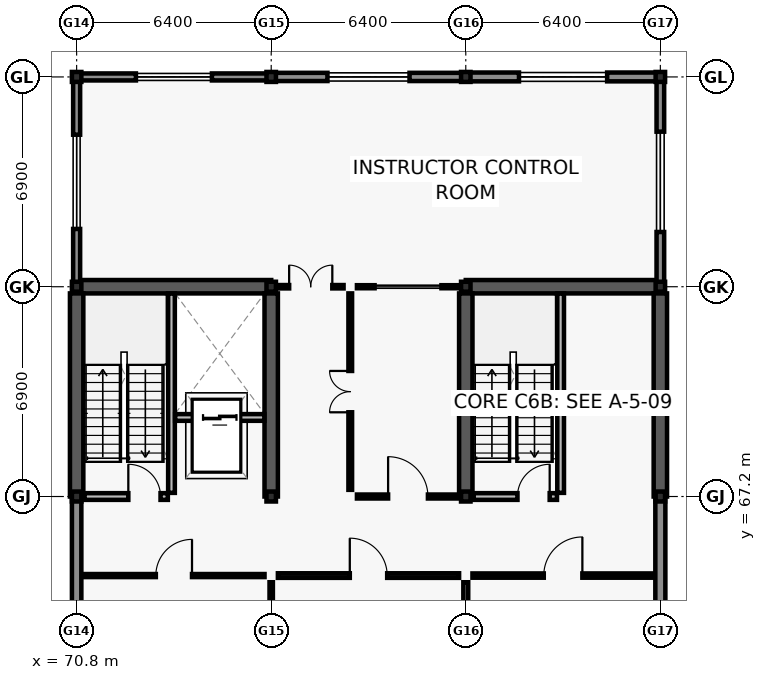
"""IFC4 building model, lengths in metres.
Left out: names, types, materials, properties, quantities, classifications, styles, units other than length and angle.
Written with IfcOpenShell. Run it as: python <this file> out.ifc"""

import sys

from ifc_helpers import new_model, si_unit, direction, frame, frame_2d, origin, origin_2d, place, context, subcontext, project, spatial, rectangle, i_section, extrude, element, fill, save


model = new_model("IFC4")
c1 = context("Model", 3, precision=1e-05, world=origin(), true_north=direction((0.0, 1.0)))
c2 = subcontext(c1, "Body", "Model", "MODEL_VIEW")
j1 = project(units=[si_unit("LENGTHUNIT", "METRE"), si_unit("PLANEANGLEUNIT", "RADIAN")], contexts=[c1])
p1 = place(None, origin())
s1 = spatial("IfcSite", under=j1, at=p1, CompositionType="ELEMENT")
p2 = place(p1, origin())
s2 = spatial("IfcBuilding", under=s1, at=p2, CompositionType="ELEMENT")
p3 = place(p2, frame((0.0, 0.0, 5.4)))
s3 = spatial("IfcBuildingStorey", under=s2, at=p3, CompositionType="ELEMENT", Elevation=5.4)
for number, where, z_axis, x_axis in (
    (1, (70.8, 67.2, 0.0), (0.0, 0.0, 1.0), (1.0, 0.0, 0.0)),
    (2, (70.8, 74.1, 0.0), (0.0, 0.0, 1.0), (1.0, 0.0, 0.0)),
    (3, (70.8, 81.0, 0.0), (0.0, 0.0, 1.0), (1.0, 0.0, 0.0)),
    (4, (77.2, 67.2, 0.0), (0.0, 0.0, 1.0), (1.0, 0.0, 0.0)),
    (5, (77.2, 74.1, 0.0), (0.0, 0.0, 1.0), (1.0, 0.0, 0.0)),
    (6, (77.2, 81.0, 0.0), (0.0, 0.0, 1.0), (1.0, 0.0, 0.0)),
    (7, (83.6, 67.2, 0.0), (0.0, 0.0, 1.0), (1.0, 0.0, 0.0)),
    (8, (83.6, 74.1, 0.0), (0.0, 0.0, 1.0), (1.0, 0.0, 0.0)),
    (9, (83.6, 81.0, 0.0), (0.0, 0.0, 1.0), (1.0, 0.0, 0.0)),
    (10, (90.0, 67.2, 0.0), (0.0, 0.0, 1.0), (1.0, 0.0, 0.0)),
    (11, (90.0, 74.1, 0.0), (0.0, 0.0, 1.0), (1.0, 0.0, 0.0)),
    (12, (90.0, 81.0, 0.0), (0.0, 0.0, 1.0), (1.0, 0.0, 0.0)),
):
    element("IfcColumn", number, at=place(p3, frame(where, z_axis=z_axis, x_axis=x_axis)), inside=s3, PredefinedType="COLUMN", context=c2, shape_type="SweptSolid", body=[
        extrude(i_section(OverallWidth=0.311, OverallDepth=0.327, WebThickness=0.016, FlangeThickness=0.025, FilletRadius=0.017, at=origin_2d()), origin(), (0.0, 0.0, 1.0), 4.2),
    ])
p4 = place(p3, frame((70.8, 74.1, 0.0), z_axis=(0.0, 0.0, 1.0), x_axis=(1.0, 0.0, 0.0)))
e13 = element("IfcWall", 13, at=p4, inside=s3, PredefinedType="SHEAR", context=c2, shape_type="SweptSolid", body=[
    extrude(rectangle(XDim=6.4, YDim=0.44, at=frame_2d((3.2, 0.0))), origin(), (0.0, 0.0, 1.0), 3.96),
])
for number, where, z_axis, x_axis in (
    (14, (70.8, 67.2, 0.0), (0.0, 0.0, 1.0), (0.0, 1.0, 0.0)),
    (15, (77.2, 67.2, 0.0), (0.0, 0.0, 1.0), (0.0, 1.0, 0.0)),
):
    element("IfcWall", number, at=place(p3, frame(where, z_axis=z_axis, x_axis=x_axis)), inside=s3, PredefinedType="SHEAR", context=c2, shape_type="SweptSolid", body=[
        extrude(rectangle(XDim=6.68, YDim=0.44, at=frame_2d((3.34, 0.0))), origin(), (0.0, 0.0, 1.0), 3.96),
    ])
p5 = place(p3, frame((83.6, 74.1, 0.0), z_axis=(0.0, 0.0, 1.0), x_axis=(1.0, 0.0, 0.0)))
e16 = element("IfcWall", 16, at=p5, inside=s3, PredefinedType="SHEAR", context=c2, shape_type="SweptSolid", body=[
    extrude(rectangle(XDim=6.4, YDim=0.44, at=frame_2d((3.2, 0.0))), origin(), (0.0, 0.0, 1.0), 3.96),
])
for number, where, z_axis, x_axis in (
    (17, (83.6, 67.2, 0.0), (0.0, 0.0, 1.0), (0.0, 1.0, 0.0)),
    (18, (90.0, 67.2, 0.0), (0.0, 0.0, 1.0), (0.0, 1.0, 0.0)),
):
    element("IfcWall", number, at=place(p3, frame(where, z_axis=z_axis, x_axis=x_axis)), inside=s3, PredefinedType="SHEAR", context=c2, shape_type="SweptSolid", body=[
        extrude(rectangle(XDim=6.68, YDim=0.44, at=frame_2d((3.34, 0.0))), origin(), (0.0, 0.0, 1.0), 3.96),
    ])
p6 = place(p3, frame((70.805, 81.0, 0.0), z_axis=(0.0, 0.0, 1.0), x_axis=(1.0, 0.0, 0.0)))
e19 = element("IfcWall", 19, at=p6, inside=s3, PredefinedType="SOLIDWALL", context=c2, shape_type="SweptSolid", body=[
    extrude(rectangle(XDim=6.39, YDim=0.23, at=frame_2d((3.195, 0.0))), origin(), (0.0, 0.0, 1.0), 3.32),
])
p7 = place(p6, frame((1.945, 0.0, 0.8)))
e20 = element("IfcOpeningElement", 20, at=p7, cuts=e19, PredefinedType="OPENING", context=c2, shape_type="SweptSolid", body=[
    extrude(rectangle(XDim=2.5, YDim=1.15, at=frame_2d((1.25, 0.575))), frame((0.0, 0.125, 0.0), z_axis=(0.0, -1.0, 0.0), x_axis=(1.0, 0.0, 0.0)), (0.0, 0.0, 1.0), 0.25),
])
p8 = place(p3, frame((77.205, 81.0, 0.0), z_axis=(0.0, 0.0, 1.0), x_axis=(1.0, 0.0, 0.0)))
e21 = element("IfcWall", 21, at=p8, inside=s3, PredefinedType="SOLIDWALL", context=c2, shape_type="SweptSolid", body=[
    extrude(rectangle(XDim=6.39, YDim=0.27, at=frame_2d((3.195, 0.0))), origin(), (0.0, 0.0, 1.0), 3.32),
])
p9 = place(p8, frame((1.845, 0.0, 0.8)))
e22 = element("IfcOpeningElement", 22, at=p9, cuts=e21, PredefinedType="OPENING", context=c2, shape_type="SweptSolid", body=[
    extrude(rectangle(XDim=2.7, YDim=1.15, at=frame_2d((1.35, 0.575))), frame((0.0, 0.145, 0.0), z_axis=(0.0, -1.0, 0.0), x_axis=(1.0, 0.0, 0.0)), (0.0, 0.0, 1.0), 0.29),
])
p10 = place(p3, frame((83.605, 81.0, 0.0), z_axis=(0.0, 0.0, 1.0), x_axis=(1.0, 0.0, 0.0)))
e23 = element("IfcWall", 23, at=p10, inside=s3, PredefinedType="SOLIDWALL", context=c2, shape_type="SweptSolid", body=[
    extrude(rectangle(XDim=6.39, YDim=0.29, at=frame_2d((3.195, 0.0))), origin(), (0.0, 0.0, 1.0), 3.32),
])
p11 = place(p10, frame((1.745, 0.0, 0.8)))
e24 = element("IfcOpeningElement", 24, at=p11, cuts=e23, PredefinedType="OPENING", context=c2, shape_type="SweptSolid", body=[
    extrude(rectangle(XDim=2.9, YDim=1.15, at=frame_2d((1.45, 0.575))), frame((0.0, 0.155, 0.0), z_axis=(0.0, -1.0, 0.0), x_axis=(1.0, 0.0, 0.0)), (0.0, 0.0, 1.0), 0.31),
])
p12 = place(p3, frame((70.8, 60.305, 0.0), z_axis=(0.0, 0.0, 1.0), x_axis=(0.0, 1.0, 0.0)))
e25 = element("IfcWall", 25, at=p12, inside=s3, PredefinedType="SOLIDWALL", context=c2, shape_type="SweptSolid", body=[
    extrude(rectangle(XDim=6.89, YDim=0.31, at=frame_2d((3.445, 0.0))), origin(), (0.0, 0.0, 1.0), 3.32),
])
p13 = place(p3, frame((90.0, 67.195, 0.0), z_axis=(0.0, 0.0, 1.0), x_axis=(0.0, -1.0, 0.0)))
e26 = element("IfcWall", 26, at=p13, inside=s3, PredefinedType="SOLIDWALL", context=c2, shape_type="SweptSolid", body=[
    extrude(rectangle(XDim=6.89, YDim=0.33, at=frame_2d((3.445, 0.0))), origin(), (0.0, 0.0, 1.0), 3.32),
])
p14 = place(p3, frame((70.8, 74.105, 0.0), z_axis=(0.0, 0.0, 1.0), x_axis=(0.0, 1.0, 0.0)))
e27 = element("IfcWall", 27, at=p14, inside=s3, PredefinedType="SOLIDWALL", context=c2, shape_type="SweptSolid", body=[
    extrude(rectangle(XDim=6.89, YDim=0.23, at=frame_2d((3.445, 0.0))), origin(), (0.0, 0.0, 1.0), 3.32),
])
p15 = place(p14, frame((1.895, 0.0, 0.8)))
e28 = element("IfcOpeningElement", 28, at=p15, cuts=e27, PredefinedType="OPENING", context=c2, shape_type="SweptSolid", body=[
    extrude(rectangle(XDim=3.1, YDim=1.15, at=frame_2d((1.55, 0.575))), frame((0.0, 0.125, 0.0), z_axis=(0.0, -1.0, 0.0), x_axis=(1.0, 0.0, 0.0)), (0.0, 0.0, 1.0), 0.25),
])
p16 = place(p3, frame((90.0, 80.995, 0.0), z_axis=(0.0, 0.0, 1.0), x_axis=(0.0, -1.0, 0.0)))
e29 = element("IfcWall", 29, at=p16, inside=s3, PredefinedType="SOLIDWALL", context=c2, shape_type="SweptSolid", body=[
    extrude(rectangle(XDim=6.89, YDim=0.25, at=frame_2d((3.445, 0.0))), origin(), (0.0, 0.0, 1.0), 3.32),
])
p17 = place(p16, frame((1.795, 0.0, 0.8)))
e30 = element("IfcOpeningElement", 30, at=p17, cuts=e29, PredefinedType="OPENING", context=c2, shape_type="SweptSolid", body=[
    extrude(rectangle(XDim=3.3, YDim=1.25, at=frame_2d((1.65, 0.625))), frame((0.0, 0.135, 0.0), z_axis=(0.0, -1.0, 0.0), x_axis=(1.0, 0.0, 0.0)), (0.0, 0.0, 1.0), 0.27),
])
p18 = place(p3, frame((73.92, 67.32, 0.0), z_axis=(0.0, 0.0, 1.0), x_axis=(0.0, 1.0, 0.0)))
e31 = element("IfcWall", 31, at=p18, inside=s3, PredefinedType="SOLIDWALL", context=c2, shape_type="SweptSolid", body=[
    extrude(rectangle(XDim=6.555, YDim=0.22, at=frame_2d((3.277, 0.0))), origin(), (0.0, 0.0, 1.0), 3.96),
])
p19 = place(p3, frame((71.06, 67.2, 0.0), z_axis=(0.0, 0.0, 1.0), x_axis=(1.0, 0.0, 0.0)))
e32 = element("IfcWall", 32, at=p19, inside=s3, PredefinedType="SOLIDWALL", context=c2, shape_type="SweptSolid", body=[
    extrude(rectangle(XDim=2.74, YDim=0.22, at=frame_2d((1.37, 0.0))), origin(), (0.0, 0.0, 1.0), 3.32),
])
p20 = place(p19, frame((1.44, 0.0, 0.0)))
e33 = element("IfcOpeningElement", 33, at=p20, cuts=e32, PredefinedType="OPENING", context=c2, shape_type="SweptSolid", body=[
    extrude(rectangle(XDim=1.06, YDim=2.1, at=frame_2d((0.53, 1.05))), frame((0.0, 0.12, 0.0), z_axis=(0.0, -1.0, 0.0), x_axis=(1.0, 0.0, 0.0)), (0.0, 0.0, 1.0), 0.24),
])
p21 = place(p3, frame((74.04, 69.8, 0.0), z_axis=(0.0, 0.0, 1.0), x_axis=(1.0, 0.0, 0.0)))
e34 = element("IfcWall", 34, at=p21, inside=s3, PredefinedType="SOLIDWALL", context=c2, shape_type="SweptSolid", body=[
    extrude(rectangle(XDim=2.935, YDim=0.22, at=frame_2d((1.468, 0.0))), origin(), (0.0, 0.0, 1.0), 3.96),
])
p22 = place(p21, frame((0.917, 0.0, 0.0)))
e35 = element("IfcOpeningElement", 35, at=p22, cuts=e34, PredefinedType="OPENING", context=c2, shape_type="SweptSolid", body=[
    extrude(rectangle(XDim=1.1, YDim=2.1, at=frame_2d((0.55, 1.05))), frame((0.0, 0.12, 0.0), z_axis=(0.0, -1.0, 0.0), x_axis=(1.0, 0.0, 0.0)), (0.0, 0.0, 1.0), 0.24),
])
p23 = place(p3, frame((86.72, 67.32, 0.0), z_axis=(0.0, 0.0, 1.0), x_axis=(0.0, 1.0, 0.0)))
e36 = element("IfcWall", 36, at=p23, inside=s3, PredefinedType="SOLIDWALL", context=c2, shape_type="SweptSolid", body=[
    extrude(rectangle(XDim=6.555, YDim=0.22, at=frame_2d((3.277, 0.0))), origin(), (0.0, 0.0, 1.0), 3.96),
])
p24 = place(p3, frame((83.86, 67.2, 0.0), z_axis=(0.0, 0.0, 1.0), x_axis=(1.0, 0.0, 0.0)))
e37 = element("IfcWall", 37, at=p24, inside=s3, PredefinedType="SOLIDWALL", context=c2, shape_type="SweptSolid", body=[
    extrude(rectangle(XDim=2.74, YDim=0.22, at=frame_2d((1.37, 0.0))), origin(), (0.0, 0.0, 1.0), 3.32),
])
p25 = place(p24, frame((1.44, 0.0, 0.0)))
e38 = element("IfcOpeningElement", 38, at=p25, cuts=e37, PredefinedType="OPENING", context=c2, shape_type="SweptSolid", body=[
    extrude(rectangle(XDim=1.06, YDim=2.1, at=frame_2d((0.53, 1.05))), frame((0.0, 0.12, 0.0), z_axis=(0.0, -1.0, 0.0), x_axis=(1.0, 0.0, 0.0)), (0.0, 0.0, 1.0), 0.24),
])
p26 = place(p3, frame((77.2, 60.52, 0.0), z_axis=(0.0, 0.0, 1.0), x_axis=(0.0, 1.0, 0.0)))
e39 = element("IfcWall", 39, at=p26, inside=s3, PredefinedType="PARTITIONING", context=c2, shape_type="SweptSolid", body=[
    extrude(rectangle(XDim=3.86, YDim=0.11, at=frame_2d((1.93, 0.0))), origin(), (0.0, 0.0, 1.0), 3.3),
])
p27 = place(p3, frame((71.02, 64.6, 0.0), z_axis=(0.0, 0.0, 1.0), x_axis=(1.0, 0.0, 0.0)))
e40 = element("IfcWall", 40, at=p27, inside=s3, PredefinedType="PARTITIONING", context=c2, shape_type="SweptSolid", body=[
    extrude(rectangle(XDim=5.96, YDim=0.1, at=frame_2d((2.98, 0.0))), origin(), (0.0, 0.0, 1.0), 3.3),
])
p28 = place(p27, frame((2.385, 0.0, 0.0)))
e41 = element("IfcOpeningElement", 41, at=p28, cuts=e40, PredefinedType="OPENING", context=c2, shape_type="SweptSolid", body=[
    extrude(rectangle(XDim=1.19, YDim=2.14, at=frame_2d((0.595, 1.07))), frame((0.0, 0.06, 0.0), z_axis=(0.0, -1.0, 0.0), x_axis=(1.0, 0.0, 0.0)), (0.0, 0.0, 1.0), 0.12),
])
p29 = place(p3, frame((83.6, 60.52, 0.0), z_axis=(0.0, 0.0, 1.0), x_axis=(0.0, 1.0, 0.0)))
e42 = element("IfcWall", 42, at=p29, inside=s3, PredefinedType="PARTITIONING", context=c2, shape_type="SweptSolid", body=[
    extrude(rectangle(XDim=3.86, YDim=0.16, at=frame_2d((1.93, 0.0))), origin(), (0.0, 0.0, 1.0), 3.3),
])
p30 = place(p3, frame((77.42, 64.6, 0.0), z_axis=(0.0, 0.0, 1.0), x_axis=(1.0, 0.0, 0.0)))
e43 = element("IfcWall", 43, at=p30, inside=s3, PredefinedType="PARTITIONING", context=c2, shape_type="SweptSolid", body=[
    extrude(rectangle(XDim=5.96, YDim=0.15, at=frame_2d((2.98, 0.0))), origin(), (0.0, 0.0, 1.0), 3.3),
])
p31 = place(p30, frame((2.365, 0.0, 0.0)))
e44 = element("IfcOpeningElement", 44, at=p31, cuts=e43, PredefinedType="OPENING", context=c2, shape_type="SweptSolid", body=[
    extrude(rectangle(XDim=1.23, YDim=2.08, at=frame_2d((0.615, 1.04))), frame((0.0, 0.085, 0.0), z_axis=(0.0, -1.0, 0.0), x_axis=(1.0, 0.0, 0.0)), (0.0, 0.0, 1.0), 0.17),
])
p32 = place(p3, frame((83.82, 64.6, 0.0), z_axis=(0.0, 0.0, 1.0), x_axis=(1.0, 0.0, 0.0)))
e45 = element("IfcWall", 45, at=p32, inside=s3, PredefinedType="PARTITIONING", context=c2, shape_type="SweptSolid", body=[
    extrude(rectangle(XDim=5.96, YDim=0.14, at=frame_2d((2.98, 0.0))), origin(), (0.0, 0.0, 1.0), 3.3),
])
p33 = place(p32, frame((2.345, 0.0, 0.0)))
e46 = element("IfcOpeningElement", 46, at=p33, cuts=e45, PredefinedType="OPENING", context=c2, shape_type="SweptSolid", body=[
    extrude(rectangle(XDim=1.27, YDim=2.1, at=frame_2d((0.635, 1.05))), frame((0.0, 0.08, 0.0), z_axis=(0.0, -1.0, 0.0), x_axis=(1.0, 0.0, 0.0)), (0.0, 0.0, 1.0), 0.16),
])
p34 = place(p3, frame((80.02, 67.2, 0.0), z_axis=(0.0, 0.0, 1.0), x_axis=(1.0, 0.0, 0.0)))
e47 = element("IfcWall", 47, at=p34, inside=s3, PredefinedType="PARTITIONING", context=c2, shape_type="SweptSolid", body=[
    extrude(rectangle(XDim=3.36, YDim=0.13, at=frame_2d((1.68, 0.0))), origin(), (0.0, 0.0, 1.0), 3.3),
])
p35 = place(p34, frame((1.025, 0.0, 0.0)))
e48 = element("IfcOpeningElement", 48, at=p35, cuts=e47, PredefinedType="OPENING", context=c2, shape_type="SweptSolid", body=[
    extrude(rectangle(XDim=1.31, YDim=2.14, at=frame_2d((0.655, 1.07))), frame((0.0, 0.075, 0.0), z_axis=(0.0, -1.0, 0.0), x_axis=(1.0, 0.0, 0.0)), (0.0, 0.0, 1.0), 0.15),
])
p36 = place(p3, frame((79.8, 67.42, 0.0), z_axis=(0.0, 0.0, 1.0), x_axis=(0.0, 1.0, 0.0)))
e49 = element("IfcWall", 49, at=p36, inside=s3, PredefinedType="PARTITIONING", context=c2, shape_type="SweptSolid", body=[
    extrude(rectangle(XDim=6.46, YDim=0.12, at=frame_2d((3.23, 0.0))), origin(), (0.0, 0.0, 1.0), 3.3),
])
p37 = place(p36, frame((2.55, 0.0, 0.0)))
e50 = element("IfcOpeningElement", 50, at=p37, cuts=e49, PredefinedType="OPENING", context=c2, shape_type="SweptSolid", body=[
    extrude(rectangle(XDim=1.36, YDim=2.15, at=frame_2d((0.68, 1.075))), frame((0.0, 0.07, 0.0), z_axis=(0.0, -1.0, 0.0), x_axis=(1.0, 0.0, 0.0)), (0.0, 0.0, 1.0), 0.14),
])
p38 = place(p3, frame((77.42, 74.1, 0.0), z_axis=(0.0, 0.0, 1.0), x_axis=(1.0, 0.0, 0.0)))
e51 = element("IfcWall", 51, at=p38, inside=s3, PredefinedType="PARTITIONING", context=c2, shape_type="SweptSolid", body=[
    extrude(rectangle(XDim=2.16, YDim=0.11, at=frame_2d((1.08, 0.0))), origin(), (0.0, 0.0, 1.0), 3.3),
])
p39 = place(p38, frame((0.37, 0.0, 0.0)))
e52 = element("IfcOpeningElement", 52, at=p39, cuts=e51, PredefinedType="OPENING", context=c2, shape_type="SweptSolid", body=[
    extrude(rectangle(XDim=1.42, YDim=2.15, at=frame_2d((0.71, 1.075))), frame((0.0, 0.065, 0.0), z_axis=(0.0, -1.0, 0.0), x_axis=(1.0, 0.0, 0.0)), (0.0, 0.0, 1.0), 0.13),
])
p40 = place(p3, frame((80.02, 74.1, 0.0), z_axis=(0.0, 0.0, 1.0), x_axis=(1.0, 0.0, 0.0)))
e53 = element("IfcWall", 53, at=p40, inside=s3, PredefinedType="PARTITIONING", context=c2, shape_type="SweptSolid", body=[
    extrude(rectangle(XDim=3.36, YDim=0.1, at=frame_2d((1.68, 0.0))), origin(), (0.0, 0.0, 1.0), 3.3),
])
p41 = place(p40, frame((0.58, 0.0, 0.95)))
e54 = element("IfcOpeningElement", 54, at=p41, cuts=e53, PredefinedType="OPENING", context=c2, shape_type="SweptSolid", body=[
    extrude(rectangle(XDim=2.2, YDim=1.3, at=frame_2d((1.1, 0.65))), frame((0.0, 0.06, 0.0), z_axis=(0.0, -1.0, 0.0), x_axis=(1.0, 0.0, 0.0)), (0.0, 0.0, 1.0), 0.12),
])
p42 = place(p7, origin())
e55 = element("IfcWindow", 55, at=p42, inside=s3, PartitioningType="TRIPLE_PANEL_VERTICAL", PredefinedType="WINDOW", context=c2, shape_type="SweptSolid", body=[
    extrude(rectangle(XDim=2.5, YDim=1.15, at=frame_2d((1.25, 0.575))), frame((0.0, 0.03, 0.0), z_axis=(0.0, -1.0, 0.0), x_axis=(1.0, 0.0, 0.0)), (0.0, 0.0, 1.0), 0.06),
])
fill(e20, e55)
p43 = place(p9, origin())
e56 = element("IfcWindow", 56, at=p43, inside=s3, PartitioningType="TRIPLE_PANEL_VERTICAL", PredefinedType="WINDOW", context=c2, shape_type="SweptSolid", body=[
    extrude(rectangle(XDim=2.7, YDim=1.15, at=frame_2d((1.35, 0.575))), frame((0.0, 0.03, 0.0), z_axis=(0.0, -1.0, 0.0), x_axis=(1.0, 0.0, 0.0)), (0.0, 0.0, 1.0), 0.06),
])
fill(e22, e56)
p44 = place(p11, origin())
e57 = element("IfcWindow", 57, at=p44, inside=s3, PartitioningType="TRIPLE_PANEL_VERTICAL", PredefinedType="WINDOW", context=c2, shape_type="SweptSolid", body=[
    extrude(rectangle(XDim=2.9, YDim=1.15, at=frame_2d((1.45, 0.575))), frame((0.0, 0.03, 0.0), z_axis=(0.0, -1.0, 0.0), x_axis=(1.0, 0.0, 0.0)), (0.0, 0.0, 1.0), 0.06),
])
fill(e24, e57)
p45 = place(p15, origin())
e58 = element("IfcWindow", 58, at=p45, inside=s3, PartitioningType="TRIPLE_PANEL_VERTICAL", PredefinedType="WINDOW", context=c2, shape_type="SweptSolid", body=[
    extrude(rectangle(XDim=3.1, YDim=1.15, at=frame_2d((1.55, 0.575))), frame((0.0, 0.03, 0.0), z_axis=(0.0, -1.0, 0.0), x_axis=(1.0, 0.0, 0.0)), (0.0, 0.0, 1.0), 0.06),
])
fill(e28, e58)
p46 = place(p17, origin())
e59 = element("IfcWindow", 59, at=p46, inside=s3, PartitioningType="TRIPLE_PANEL_VERTICAL", PredefinedType="WINDOW", context=c2, shape_type="SweptSolid", body=[
    extrude(rectangle(XDim=3.3, YDim=1.25, at=frame_2d((1.65, 0.625))), frame((0.0, 0.03, 0.0), z_axis=(0.0, -1.0, 0.0), x_axis=(1.0, 0.0, 0.0)), (0.0, 0.0, 1.0), 0.06),
])
fill(e30, e59)
p47 = place(p20, origin())
e60 = element("IfcDoor", 60, at=p47, inside=s3, OperationType="SINGLE_SWING_LEFT", PredefinedType="DOOR", context=c2, shape_type="SweptSolid", body=[
    extrude(rectangle(XDim=1.06, YDim=2.1, at=frame_2d((0.53, 1.05))), frame((0.0, 0.025, 0.0), z_axis=(0.0, -1.0, 0.0), x_axis=(1.0, 0.0, 0.0)), (0.0, 0.0, 1.0), 0.05),
])
fill(e33, e60)
p48 = place(p22, origin())
e61 = element("IfcDoor", 61, at=p48, inside=s3, OperationType="DOUBLE_DOOR_SLIDING", PredefinedType="DOOR", context=c2, shape_type="SweptSolid", body=[
    extrude(rectangle(XDim=1.1, YDim=2.1, at=frame_2d((0.55, 1.05))), frame((0.0, 0.025, 0.0), z_axis=(0.0, -1.0, 0.0), x_axis=(1.0, 0.0, 0.0)), (0.0, 0.0, 1.0), 0.05),
])
fill(e35, e61)
p49 = place(p25, origin())
e62 = element("IfcDoor", 62, at=p49, inside=s3, OperationType="SINGLE_SWING_RIGHT", PredefinedType="DOOR", context=c2, shape_type="SweptSolid", body=[
    extrude(rectangle(XDim=1.06, YDim=2.1, at=frame_2d((0.53, 1.05))), frame((0.0, 0.025, 0.0), z_axis=(0.0, -1.0, 0.0), x_axis=(1.0, 0.0, 0.0)), (0.0, 0.0, 1.0), 0.05),
])
fill(e38, e62)
p50 = place(p28, origin())
e63 = element("IfcDoor", 63, at=p50, inside=s3, OperationType="SINGLE_SWING_RIGHT", PredefinedType="DOOR", context=c2, shape_type="SweptSolid", body=[
    extrude(rectangle(XDim=1.19, YDim=2.14, at=frame_2d((0.595, 1.07))), frame((0.0, 0.025, 0.0), z_axis=(0.0, -1.0, 0.0), x_axis=(1.0, 0.0, 0.0)), (0.0, 0.0, 1.0), 0.05),
])
fill(e41, e63)
p51 = place(p31, origin())
e64 = element("IfcDoor", 64, at=p51, inside=s3, OperationType="SINGLE_SWING_LEFT", PredefinedType="DOOR", context=c2, shape_type="SweptSolid", body=[
    extrude(rectangle(XDim=1.23, YDim=2.08, at=frame_2d((0.615, 1.04))), frame((0.0, 0.025, 0.0), z_axis=(0.0, -1.0, 0.0), x_axis=(1.0, 0.0, 0.0)), (0.0, 0.0, 1.0), 0.05),
])
fill(e44, e64)
p52 = place(p33, origin())
e65 = element("IfcDoor", 65, at=p52, inside=s3, OperationType="SINGLE_SWING_RIGHT", PredefinedType="DOOR", context=c2, shape_type="SweptSolid", body=[
    extrude(rectangle(XDim=1.27, YDim=2.1, at=frame_2d((0.635, 1.05))), frame((0.0, 0.025, 0.0), z_axis=(0.0, -1.0, 0.0), x_axis=(1.0, 0.0, 0.0)), (0.0, 0.0, 1.0), 0.05),
])
fill(e46, e65)
p53 = place(p35, origin())
e66 = element("IfcDoor", 66, at=p53, inside=s3, OperationType="SINGLE_SWING_LEFT", PredefinedType="DOOR", context=c2, shape_type="SweptSolid", body=[
    extrude(rectangle(XDim=1.31, YDim=2.14, at=frame_2d((0.655, 1.07))), frame((0.0, 0.025, 0.0), z_axis=(0.0, -1.0, 0.0), x_axis=(1.0, 0.0, 0.0)), (0.0, 0.0, 1.0), 0.05),
])
fill(e48, e66)
p54 = place(p37, origin())
e67 = element("IfcDoor", 67, at=p54, inside=s3, OperationType="DOUBLE_DOOR_SINGLE_SWING", PredefinedType="DOOR", context=c2, shape_type="SweptSolid", body=[
    extrude(rectangle(XDim=1.36, YDim=2.15, at=frame_2d((0.68, 1.075))), frame((0.0, 0.025, 0.0), z_axis=(0.0, -1.0, 0.0), x_axis=(1.0, 0.0, 0.0)), (0.0, 0.0, 1.0), 0.05),
])
fill(e50, e67)
p55 = place(p39, origin())
e68 = element("IfcDoor", 68, at=p55, inside=s3, OperationType="DOUBLE_DOOR_SINGLE_SWING", PredefinedType="DOOR", context=c2, shape_type="SweptSolid", body=[
    extrude(rectangle(XDim=1.42, YDim=2.15, at=frame_2d((0.71, 1.075))), frame((0.0, 0.025, 0.0), z_axis=(0.0, -1.0, 0.0), x_axis=(1.0, 0.0, 0.0)), (0.0, 0.0, 1.0), 0.05),
])
fill(e52, e68)
p56 = place(p41, origin())
e69 = element("IfcWindow", 69, at=p56, inside=s3, PartitioningType="DOUBLE_PANEL_VERTICAL", PredefinedType="WINDOW", context=c2, shape_type="SweptSolid", body=[
    extrude(rectangle(XDim=2.2, YDim=1.3, at=frame_2d((1.1, 0.65))), frame((0.0, 0.03, 0.0), z_axis=(0.0, -1.0, 0.0), x_axis=(1.0, 0.0, 0.0)), (0.0, 0.0, 1.0), 0.06),
])
fill(e54, e69)
save(model, sys.argv[1])
